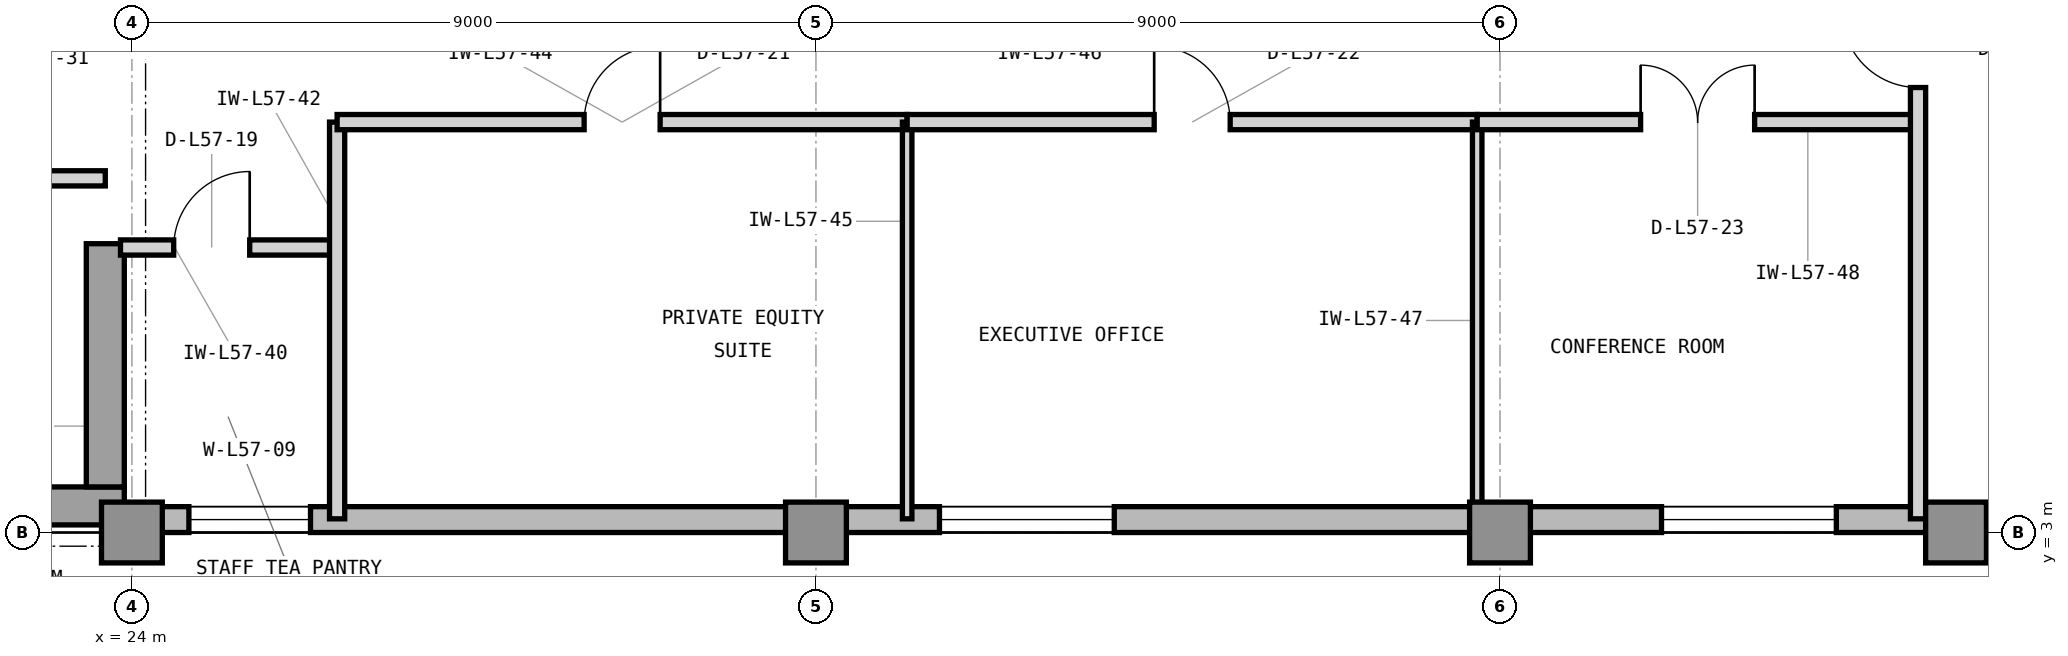
"""IFC4 building model, lengths in metres.
Left out: names, types, materials, properties, quantities, classifications, styles, units other than length and angle.
Written with IfcOpenShell. Run it as: python <this file> out.ifc"""

import sys

from ifc_helpers import new_model, si_unit, direction, frame, frame_2d, origin, origin_2d, place, context, subcontext, project, spatial, rectangle, extrude, element, fill, save


model = new_model("IFC4")
c1 = context("Model", 3, precision=1e-05, world=origin(), true_north=direction((0.0, 1.0)))
c2 = subcontext(c1, "Body", "Model", "MODEL_VIEW")
j1 = project(units=[si_unit("LENGTHUNIT", "METRE"), si_unit("PLANEANGLEUNIT", "RADIAN")], contexts=[c1])
p1 = place(None, origin())
s1 = spatial("IfcSite", under=j1, at=p1, CompositionType="ELEMENT")
p2 = place(p1, origin())
s2 = spatial("IfcBuilding", under=s1, at=p2, CompositionType="ELEMENT")
p3 = place(p2, frame((0.0, 0.0, 235.2)))
s3 = spatial("IfcBuildingStorey", under=s2, at=p3, CompositionType="ELEMENT", Elevation=235.2)
p4 = place(p3, frame((7.475, 3.35, 0.0), z_axis=(0.0, 0.0, 1.0), x_axis=(1.0, 0.0, 0.0)))
e1 = element("IfcWall", 1, at=p4, inside=s3, PredefinedType="SHEAR", context=c2, shape_type="SweptSolid", body=[
    extrude(rectangle(XDim=16.425, YDim=0.5, at=frame_2d((8.212, 0.0))), origin(), (0.0, 0.0, 1.0), 3.9),
])
p5 = place(p3, frame((23.65, 3.6, 0.0), z_axis=(0.0, 0.0, 1.0), x_axis=(0.0, 1.0, 0.0)))
e2 = element("IfcWall", 2, at=p5, inside=s3, PredefinedType="SHEAR", context=c2, shape_type="SweptSolid", body=[
    extrude(rectangle(XDim=3.2, YDim=0.5, at=frame_2d((1.6, 0.0))), origin(), (0.0, 0.0, 1.0), 3.9),
])
for number, where, z_axis, x_axis in (
    (3, (24.0, 3.0, 0.0), (0.0, 0.0, 1.0), (1.0, 0.0, 0.0)),
    (4, (33.0, 3.0, 0.0), (0.0, 0.0, 1.0), (1.0, 0.0, 0.0)),
    (5, (42.0, 3.0, 0.0), (0.0, 0.0, 1.0), (1.0, 0.0, 0.0)),
    (6, (48.0, 3.0, 0.0), (0.0, 0.0, 1.0), (1.0, 0.0, 0.0)),
):
    element("IfcColumn", number, at=place(p3, frame(where, z_axis=z_axis, x_axis=x_axis)), inside=s3, PredefinedType="COLUMN", context=c2, shape_type="SweptSolid", body=[
        extrude(rectangle(XDim=0.8, YDim=0.8, at=origin_2d()), origin(), (0.0, 0.0, 1.0), 3.9),
    ])
p6 = place(p3, frame((23.9, 3.17, 0.0), z_axis=(0.0, 0.0, 1.0), x_axis=(1.0, 0.0, 0.0)))
e7 = element("IfcWall", 7, at=p6, inside=s3, PredefinedType="STANDARD", context=c2, shape_type="SweptSolid", body=[
    extrude(rectangle(XDim=28.5, YDim=0.34, at=frame_2d((14.25, 0.0))), origin(), (0.0, 0.0, 1.0), 3.7),
])
p7 = place(p6, frame((10.725, 0.0, 0.9)))
e8 = element("IfcOpeningElement", 8, at=p7, cuts=e7, PredefinedType="OPENING", context=c2, shape_type="SweptSolid", body=[
    extrude(rectangle(XDim=2.3, YDim=2.2, at=frame_2d((1.15, 1.1))), frame((0.0, 0.18, 0.0), z_axis=(0.0, -1.0, 0.0), x_axis=(1.0, 0.0, 0.0)), (0.0, 0.0, 1.0), 0.36),
])
p8 = place(p6, frame((20.225, 0.0, 0.9)))
e9 = element("IfcOpeningElement", 9, at=p8, cuts=e7, PredefinedType="OPENING", context=c2, shape_type="SweptSolid", body=[
    extrude(rectangle(XDim=2.3, YDim=2.2, at=frame_2d((1.15, 1.1))), frame((0.0, 0.18, 0.0), z_axis=(0.0, -1.0, 0.0), x_axis=(1.0, 0.0, 0.0)), (0.0, 0.0, 1.0), 0.36),
])
p9 = place(p6, frame((0.85, 0.0, 0.9)))
e10 = element("IfcOpeningElement", 10, at=p9, cuts=e7, PredefinedType="OPENING", context=c2, shape_type="SweptSolid", body=[
    extrude(rectangle(XDim=1.6, YDim=2.2, at=frame_2d((0.8, 1.1))), frame((0.0, 0.18, 0.0), z_axis=(0.0, -1.0, 0.0), x_axis=(1.0, 0.0, 0.0)), (0.0, 0.0, 1.0), 0.36),
])
p10 = place(p3, frame((20.85, 7.66, 0.0), z_axis=(0.0, 0.0, 1.0), x_axis=(1.0, 0.0, 0.0)))
e11 = element("IfcWall", 11, at=p10, inside=s3, PredefinedType="PARTITIONING", context=c2, shape_type="SweptSolid", body=[
    extrude(rectangle(XDim=2.8, YDim=0.2, at=frame_2d((1.4, 0.0))), origin(), (0.0, 0.0, 1.0), 3.69),
])
p11 = place(p10, frame((0.95, 0.0, 0.0)))
e12 = element("IfcOpeningElement", 12, at=p11, cuts=e11, PredefinedType="OPENING", context=c2, shape_type="SweptSolid", body=[
    extrude(rectangle(XDim=0.9, YDim=2.1, at=frame_2d((0.45, 1.05))), frame((0.0, 0.11, 0.0), z_axis=(0.0, -1.0, 0.0), x_axis=(1.0, 0.0, 0.0)), (0.0, 0.0, 1.0), 0.22),
])
p12 = place(p3, frame((23.85, 6.75, 0.0), z_axis=(0.0, 0.0, 1.0), x_axis=(1.0, 0.0, 0.0)))
e13 = element("IfcWall", 13, at=p12, inside=s3, PredefinedType="PARTITIONING", context=c2, shape_type="SweptSolid", body=[
    extrude(rectangle(XDim=2.85, YDim=0.2, at=frame_2d((1.425, 0.0))), origin(), (0.0, 0.0, 1.0), 3.69),
])
p13 = place(p12, frame((0.7, 0.0, 0.0)))
e14 = element("IfcOpeningElement", 14, at=p13, cuts=e13, PredefinedType="OPENING", context=c2, shape_type="SweptSolid", body=[
    extrude(rectangle(XDim=1.0, YDim=2.15, at=frame_2d((0.5, 1.075))), frame((0.0, 0.11, 0.0), z_axis=(0.0, -1.0, 0.0), x_axis=(1.0, 0.0, 0.0)), (0.0, 0.0, 1.0), 0.22),
])
p14 = place(p3, frame((26.7, 3.18, 0.0), z_axis=(0.0, 0.0, 1.0), x_axis=(0.0, 1.0, 0.0)))
e15 = element("IfcWall", 15, at=p14, inside=s3, PredefinedType="PARTITIONING", context=c2, shape_type="SweptSolid", body=[
    extrude(rectangle(XDim=5.22, YDim=0.2, at=frame_2d((2.61, 0.0))), origin(), (0.0, 0.0, 1.0), 3.69),
])
p15 = place(p3, frame((26.7, 8.4, 0.0), z_axis=(0.0, 0.0, 1.0), x_axis=(1.0, 0.0, 0.0)))
e16 = element("IfcWall", 16, at=p15, inside=s3, PredefinedType="PARTITIONING", context=c2, shape_type="SweptSolid", body=[
    extrude(rectangle(XDim=7.5, YDim=0.2, at=frame_2d((3.75, 0.0))), origin(), (0.0, 0.0, 1.0), 3.69),
])
p16 = place(p15, frame((3.25, 0.0, 0.0)))
e17 = element("IfcOpeningElement", 17, at=p16, cuts=e16, PredefinedType="OPENING", context=c2, shape_type="SweptSolid", body=[
    extrude(rectangle(XDim=1.0, YDim=2.15, at=frame_2d((0.5, 1.075))), frame((0.0, 0.11, 0.0), z_axis=(0.0, -1.0, 0.0), x_axis=(1.0, 0.0, 0.0)), (0.0, 0.0, 1.0), 0.22),
])
p17 = place(p3, frame((34.2, 3.18, 0.0), z_axis=(0.0, 0.0, 1.0), x_axis=(0.0, 1.0, 0.0)))
e18 = element("IfcWall", 18, at=p17, inside=s3, PredefinedType="PARTITIONING", context=c2, shape_type="SweptSolid", body=[
    extrude(rectangle(XDim=5.22, YDim=0.125, at=frame_2d((2.61, 0.0))), origin(), (0.0, 0.0, 1.0), 3.69),
])
p18 = place(p3, frame((34.2, 8.4, 0.0), z_axis=(0.0, 0.0, 1.0), x_axis=(1.0, 0.0, 0.0)))
e19 = element("IfcWall", 19, at=p18, inside=s3, PredefinedType="PARTITIONING", context=c2, shape_type="SweptSolid", body=[
    extrude(rectangle(XDim=7.5, YDim=0.2, at=frame_2d((3.75, 0.0))), origin(), (0.0, 0.0, 1.0), 3.69),
])
p19 = place(p18, frame((3.25, 0.0, 0.0)))
e20 = element("IfcOpeningElement", 20, at=p19, cuts=e19, PredefinedType="OPENING", context=c2, shape_type="SweptSolid", body=[
    extrude(rectangle(XDim=1.0, YDim=2.15, at=frame_2d((0.5, 1.075))), frame((0.0, 0.11, 0.0), z_axis=(0.0, -1.0, 0.0), x_axis=(1.0, 0.0, 0.0)), (0.0, 0.0, 1.0), 0.22),
])
p20 = place(p3, frame((41.7, 3.18, 0.0), z_axis=(0.0, 0.0, 1.0), x_axis=(0.0, 1.0, 0.0)))
e21 = element("IfcWall", 21, at=p20, inside=s3, PredefinedType="PARTITIONING", context=c2, shape_type="SweptSolid", body=[
    extrude(rectangle(XDim=5.22, YDim=0.125, at=frame_2d((2.61, 0.0))), origin(), (0.0, 0.0, 1.0), 3.69),
])
p21 = place(p3, frame((41.7, 8.4, 0.0), z_axis=(0.0, 0.0, 1.0), x_axis=(1.0, 0.0, 0.0)))
e22 = element("IfcWall", 22, at=p21, inside=s3, PredefinedType="PARTITIONING", context=c2, shape_type="SweptSolid", body=[
    extrude(rectangle(XDim=5.8, YDim=0.2, at=frame_2d((2.9, 0.0))), origin(), (0.0, 0.0, 1.0), 3.69),
])
p22 = place(p21, frame((2.15, 0.0, 0.0)))
e23 = element("IfcOpeningElement", 23, at=p22, cuts=e22, PredefinedType="OPENING", context=c2, shape_type="SweptSolid", body=[
    extrude(rectangle(XDim=1.5, YDim=2.3, at=frame_2d((0.75, 1.15))), frame((0.0, 0.11, 0.0), z_axis=(0.0, -1.0, 0.0), x_axis=(1.0, 0.0, 0.0)), (0.0, 0.0, 1.0), 0.22),
])
p23 = place(p3, frame((47.5, 3.18, 0.0), z_axis=(0.0, 0.0, 1.0), x_axis=(0.0, 1.0, 0.0)))
e24 = element("IfcWall", 24, at=p23, inside=s3, PredefinedType="PARTITIONING", context=c2, shape_type="SweptSolid", body=[
    extrude(rectangle(XDim=17.64, YDim=0.2, at=frame_2d((8.82, 0.0))), origin(), (0.0, 0.0, 1.0), 3.69),
])
p24 = place(p23, frame((5.675, 0.0, 0.0)))
e25 = element("IfcOpeningElement", 25, at=p24, cuts=e24, PredefinedType="OPENING", context=c2, shape_type="SweptSolid", body=[
    extrude(rectangle(XDim=1.0, YDim=2.15, at=frame_2d((0.5, 1.075))), frame((0.0, 0.11, 0.0), z_axis=(0.0, -1.0, 0.0), x_axis=(1.0, 0.0, 0.0)), (0.0, 0.0, 1.0), 0.22),
])
p25 = place(p7, origin())
e26 = element("IfcWindow", 26, at=p25, inside=s3, PartitioningType="SINGLE_PANEL", PredefinedType="WINDOW", context=c2, shape_type="SweptSolid", body=[
    extrude(rectangle(XDim=2.3, YDim=2.2, at=frame_2d((1.15, 1.1))), frame((0.0, 0.11, 0.0), z_axis=(0.0, -1.0, 0.0), x_axis=(1.0, 0.0, 0.0)), (0.0, 0.0, 1.0), 0.06),
])
fill(e8, e26)
p26 = place(p8, origin())
e27 = element("IfcWindow", 27, at=p26, inside=s3, PartitioningType="SINGLE_PANEL", PredefinedType="WINDOW", context=c2, shape_type="SweptSolid", body=[
    extrude(rectangle(XDim=2.3, YDim=2.2, at=frame_2d((1.15, 1.1))), frame((0.0, 0.11, 0.0), z_axis=(0.0, -1.0, 0.0), x_axis=(1.0, 0.0, 0.0)), (0.0, 0.0, 1.0), 0.06),
])
fill(e9, e27)
p27 = place(p13, origin())
e28 = element("IfcDoor", 28, at=p27, inside=s3, OperationType="SINGLE_SWING_RIGHT", PredefinedType="DOOR", context=c2, shape_type="SweptSolid", body=[
    extrude(rectangle(XDim=1.0, YDim=2.15, at=frame_2d((0.5, 1.075))), frame((0.0, 0.025, 0.0), z_axis=(0.0, -1.0, 0.0), x_axis=(1.0, 0.0, 0.0)), (0.0, 0.0, 1.0), 0.05),
])
fill(e14, e28)
p28 = place(p16, origin())
e29 = element("IfcDoor", 29, at=p28, inside=s3, OperationType="SINGLE_SWING_RIGHT", PredefinedType="DOOR", context=c2, shape_type="SweptSolid", body=[
    extrude(rectangle(XDim=1.0, YDim=2.15, at=frame_2d((0.5, 1.075))), frame((0.0, 0.025, 0.0), z_axis=(0.0, -1.0, 0.0), x_axis=(1.0, 0.0, 0.0)), (0.0, 0.0, 1.0), 0.05),
])
fill(e17, e29)
p29 = place(p19, origin())
e30 = element("IfcDoor", 30, at=p29, inside=s3, OperationType="SINGLE_SWING_LEFT", PredefinedType="DOOR", context=c2, shape_type="SweptSolid", body=[
    extrude(rectangle(XDim=1.0, YDim=2.15, at=frame_2d((0.5, 1.075))), frame((0.0, 0.025, 0.0), z_axis=(0.0, -1.0, 0.0), x_axis=(1.0, 0.0, 0.0)), (0.0, 0.0, 1.0), 0.05),
])
fill(e20, e30)
p30 = place(p22, origin())
e31 = element("IfcDoor", 31, at=p30, inside=s3, OperationType="DOUBLE_DOOR_SINGLE_SWING", PredefinedType="DOOR", context=c2, shape_type="SweptSolid", body=[
    extrude(rectangle(XDim=1.5, YDim=2.3, at=frame_2d((0.75, 1.15))), frame((0.0, 0.025, 0.0), z_axis=(0.0, -1.0, 0.0), x_axis=(1.0, 0.0, 0.0)), (0.0, 0.0, 1.0), 0.05),
])
fill(e23, e31)
p31 = place(p24, origin())
e32 = element("IfcDoor", 32, at=p31, inside=s3, OperationType="SINGLE_SWING_RIGHT", PredefinedType="DOOR", context=c2, shape_type="SweptSolid", body=[
    extrude(rectangle(XDim=1.0, YDim=2.15, at=frame_2d((0.5, 1.075))), frame((0.0, 0.025, 0.0), z_axis=(0.0, -1.0, 0.0), x_axis=(1.0, 0.0, 0.0)), (0.0, 0.0, 1.0), 0.05),
])
fill(e25, e32)
p32 = place(p9, origin())
e33 = element("IfcWindow", 33, at=p32, inside=s3, PartitioningType="SINGLE_PANEL", PredefinedType="WINDOW", context=c2, shape_type="SweptSolid", body=[
    extrude(rectangle(XDim=1.6, YDim=2.2, at=frame_2d((0.8, 1.1))), frame((0.0, 0.11, 0.0), z_axis=(0.0, -1.0, 0.0), x_axis=(1.0, 0.0, 0.0)), (0.0, 0.0, 1.0), 0.06),
])
fill(e10, e33)
save(model, sys.argv[1])
